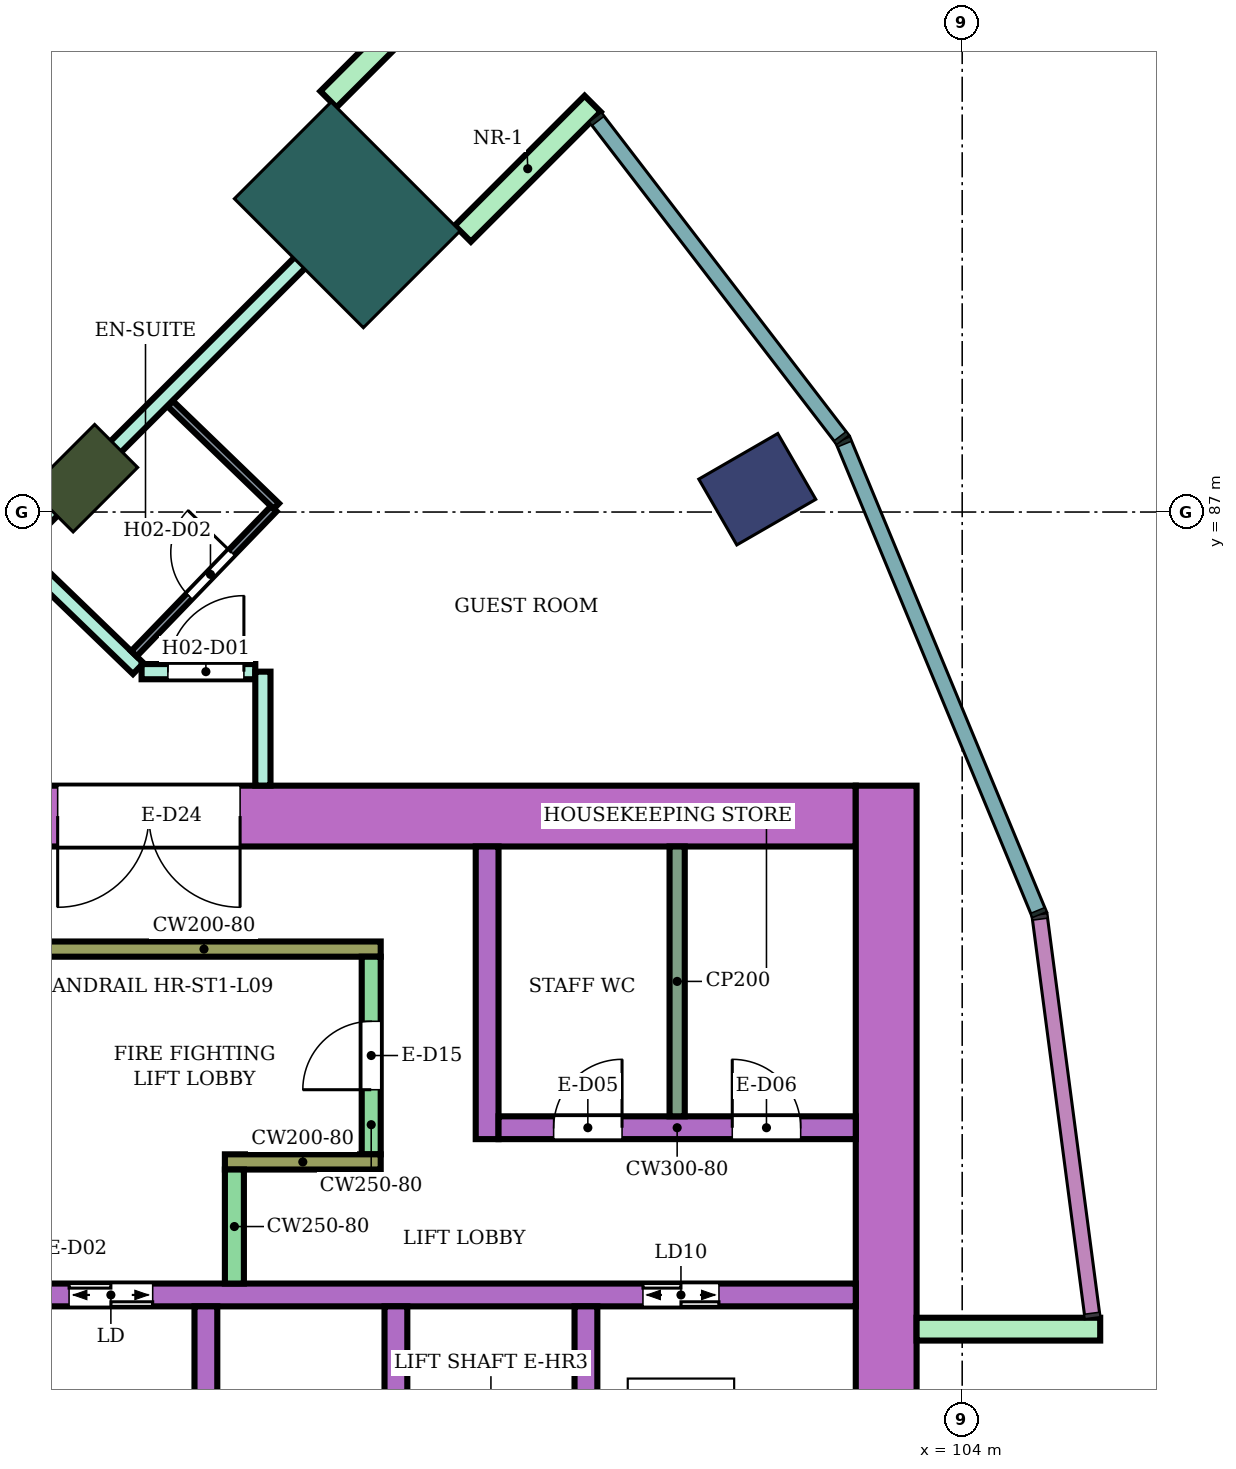
"""IFC4 building model, lengths in metres.
Left out: names, types, materials, properties, quantities, classifications, styles, units other than length and angle.
Written with IfcOpenShell. Run it as: python <this file> out.ifc"""

import sys

from ifc_helpers import new_model, si_unit, direction, frame, frame_2d, origin, origin_2d, place, context, subcontext, project, spatial, rectangle, extrude, element, fill, save


model = new_model("IFC4")
c1 = context("Model", 3, precision=1e-05, world=origin(), true_north=direction((0.0, 1.0)))
c2 = subcontext(c1, "Body", "Model", "MODEL_VIEW")
j1 = project(units=[si_unit("LENGTHUNIT", "METRE"), si_unit("PLANEANGLEUNIT", "RADIAN")], contexts=[c1])
p1 = place(None, origin())
s1 = spatial("IfcSite", under=j1, at=p1, CompositionType="ELEMENT")
p2 = place(p1, origin())
s2 = spatial("IfcBuilding", under=s1, at=p2, CompositionType="ELEMENT")
p3 = place(p2, frame((0.0, 0.0, 44.0)))
s3 = spatial("IfcBuildingStorey", under=s2, at=p3, CompositionType="ELEMENT", Elevation=44.0)
p4 = place(p3, frame((101.304, 87.3, 0.0), z_axis=(0.0, 0.0, 1.0), x_axis=(0.866025403784, 0.5, 0.0)))
e1 = element("IfcColumn", 1, at=p4, inside=s3, PredefinedType="COLUMN", context=c2, shape_type="SweptSolid", body=[
    extrude(rectangle(XDim=1.2, YDim=1.0, at=origin_2d()), origin(), (0.0, 0.0, 1.0), 3.8),
])
p5 = place(p3, frame((92.445, 87.445, 0.0), z_axis=(0.0, 0.0, 1.0), x_axis=(0.707106781187, 0.707106781187, 0.0)))
e2 = element("IfcColumn", 2, at=p5, inside=s3, PredefinedType="COLUMN", context=c2, shape_type="SweptSolid", body=[
    extrude(rectangle(XDim=1.2, YDim=0.8, at=origin_2d()), origin(), (0.0, 0.0, 1.0), 3.8),
])
p6 = place(p3, frame((95.91, 90.91, 0.0), z_axis=(0.0, 0.0, 1.0), x_axis=(0.707106781187, 0.707106781187, 0.0)))
e3 = element("IfcColumn", 3, at=p6, inside=s3, PredefinedType="COLUMN", context=c2, shape_type="SweptSolid", body=[
    extrude(rectangle(XDim=1.8, YDim=2.4, at=origin_2d()), origin(), (0.0, 0.0, 1.0), 3.8),
])
p7 = place(p3, frame((87.9, 83.0, 0.0), z_axis=(0.0, 0.0, 1.0), x_axis=(1.0, 0.0, 0.0)))
e4 = element("IfcWall", 4, at=p7, inside=s3, PredefinedType="SHEAR", context=c2, shape_type="SweptSolid", body=[
    extrude(rectangle(XDim=14.7, YDim=0.8, at=frame_2d((7.35, 0.0))), origin(), (0.0, 0.0, 1.0), 3.48),
])
p8 = place(p7, frame((4.2, 0.0, 0.0)))
e5 = element("IfcOpeningElement", 5, at=p8, cuts=e4, PredefinedType="OPENING", context=c2, shape_type="SweptSolid", body=[
    extrude(rectangle(XDim=2.4, YDim=2.4, at=frame_2d((1.2, 1.2))), frame((0.0, 0.41, 0.0), z_axis=(0.0, -1.0, 0.0), x_axis=(1.0, 0.0, 0.0)), (0.0, 0.0, 1.0), 0.82),
])
p9 = place(p3, frame((103.0, 66.6, 0.0), z_axis=(0.0, 0.0, 1.0), x_axis=(0.0, 1.0, 0.0)))
e6 = element("IfcWall", 6, at=p9, inside=s3, PredefinedType="SHEAR", context=c2, shape_type="SweptSolid", body=[
    extrude(rectangle(XDim=16.8, YDim=0.8, at=frame_2d((8.4, 0.0))), origin(), (0.0, 0.0, 1.0), 3.48),
])
p10 = place(p3, frame((91.7, 76.7, 0.0), z_axis=(0.0, 0.0, 1.0), x_axis=(1.0, 0.0, 0.0)))
e7 = element("IfcWall", 7, at=p10, inside=s3, PredefinedType="SHEAR", context=c2, shape_type="SweptSolid", body=[
    extrude(rectangle(XDim=10.9, YDim=0.3, at=frame_2d((5.45, 0.0))), origin(), (0.0, 0.0, 1.0), 3.48),
])
p11 = place(p10, frame((0.55, 0.0, 0.0)))
e8 = element("IfcOpeningElement", 8, at=p11, cuts=e7, PredefinedType="OPENING", context=c2, shape_type="SweptSolid", body=[
    extrude(rectangle(XDim=1.1, YDim=2.1, at=frame_2d((0.55, 1.05))), frame((0.0, 0.16, 0.0), z_axis=(0.0, -1.0, 0.0), x_axis=(1.0, 0.0, 0.0)), (0.0, 0.0, 1.0), 0.32),
])
p12 = place(p10, frame((8.1, 0.0, 0.0)))
e9 = element("IfcOpeningElement", 9, at=p12, cuts=e7, PredefinedType="OPENING", context=c2, shape_type="SweptSolid", body=[
    extrude(rectangle(XDim=1.0, YDim=2.1, at=frame_2d((0.5, 1.05))), frame((0.0, 0.16, 0.0), z_axis=(0.0, -1.0, 0.0), x_axis=(1.0, 0.0, 0.0)), (0.0, 0.0, 1.0), 0.32),
])
for number, where, z_axis, x_axis in (
    (10, (94.05, 74.0, 0.0), (0.0, 0.0, 1.0), (0.0, 1.0, 0.0)),
    (11, (96.55, 74.0, 0.0), (0.0, 0.0, 1.0), (0.0, 1.0, 0.0)),
    (12, (99.05, 74.0, 0.0), (0.0, 0.0, 1.0), (0.0, 1.0, 0.0)),
):
    element("IfcWall", number, at=place(p3, frame(where, z_axis=z_axis, x_axis=x_axis)), inside=s3, PredefinedType="SHEAR", context=c2, shape_type="SweptSolid", body=[
        extrude(rectangle(XDim=2.55, YDim=0.3, at=frame_2d((1.275, 0.0))), origin(), (0.0, 0.0, 1.0), 3.48),
    ])
p13 = place(p3, frame((91.7, 81.25, 0.0), z_axis=(0.0, 0.0, 1.0), x_axis=(1.0, 0.0, 0.0)))
e13 = element("IfcWall", 13, at=p13, inside=s3, PredefinedType="SHEAR", context=c2, shape_type="SweptSolid", body=[
    extrude(rectangle(XDim=4.65, YDim=0.2, at=frame_2d((2.325, 0.0))), origin(), (0.0, 0.0, 1.0), 3.48),
])
p14 = place(p3, frame((96.225, 78.55, 0.0), z_axis=(0.0, 0.0, 1.0), x_axis=(0.0, 1.0, 0.0)))
e14 = element("IfcWall", 14, at=p14, inside=s3, PredefinedType="SHEAR", context=c2, shape_type="SweptSolid", body=[
    extrude(rectangle(XDim=2.6, YDim=0.25, at=frame_2d((1.3, 0.0))), origin(), (0.0, 0.0, 1.0), 3.48),
])
p15 = place(p14, frame((0.85, 0.0, 0.0)))
e15 = element("IfcOpeningElement", 15, at=p15, cuts=e14, PredefinedType="OPENING", context=c2, shape_type="SweptSolid", body=[
    extrude(rectangle(XDim=0.9, YDim=2.1, at=frame_2d((0.45, 1.05))), frame((0.0, 0.135, 0.0), z_axis=(0.0, -1.0, 0.0), x_axis=(1.0, 0.0, 0.0)), (0.0, 0.0, 1.0), 0.27),
])
p16 = place(p3, frame((94.3, 78.45, 0.0), z_axis=(0.0, 0.0, 1.0), x_axis=(1.0, 0.0, 0.0)))
e16 = element("IfcWall", 16, at=p16, inside=s3, PredefinedType="SHEAR", context=c2, shape_type="SweptSolid", body=[
    extrude(rectangle(XDim=2.05, YDim=0.2, at=frame_2d((1.025, 0.0))), origin(), (0.0, 0.0, 1.0), 3.48),
])
p17 = place(p3, frame((94.425, 76.85, 0.0), z_axis=(0.0, 0.0, 1.0), x_axis=(0.0, 1.0, 0.0)))
e17 = element("IfcWall", 17, at=p17, inside=s3, PredefinedType="SHEAR", context=c2, shape_type="SweptSolid", body=[
    extrude(rectangle(XDim=1.5, YDim=0.25, at=frame_2d((0.75, 0.0))), origin(), (0.0, 0.0, 1.0), 3.48),
])
p18 = place(p3, frame((97.75, 78.75, 0.0), z_axis=(0.0, 0.0, 1.0), x_axis=(0.0, 1.0, 0.0)))
e18 = element("IfcWall", 18, at=p18, inside=s3, PredefinedType="SHEAR", context=c2, shape_type="SweptSolid", body=[
    extrude(rectangle(XDim=3.85, YDim=0.3, at=frame_2d((1.925, 0.0))), origin(), (0.0, 0.0, 1.0), 3.48),
])
p19 = place(p3, frame((97.9, 78.9, 0.0), z_axis=(0.0, 0.0, 1.0), x_axis=(1.0, 0.0, 0.0)))
e19 = element("IfcWall", 19, at=p19, inside=s3, PredefinedType="SHEAR", context=c2, shape_type="SweptSolid", body=[
    extrude(rectangle(XDim=4.7, YDim=0.3, at=frame_2d((2.35, 0.0))), origin(), (0.0, 0.0, 1.0), 3.48),
])
p20 = place(p19, frame((0.725, 0.0, 0.0)))
e20 = element("IfcOpeningElement", 20, at=p20, cuts=e19, PredefinedType="OPENING", context=c2, shape_type="SweptSolid", body=[
    extrude(rectangle(XDim=0.9, YDim=2.1, at=frame_2d((0.45, 1.05))), frame((0.0, 0.16, 0.0), z_axis=(0.0, -1.0, 0.0), x_axis=(1.0, 0.0, 0.0)), (0.0, 0.0, 1.0), 0.32),
])
p21 = place(p19, frame((3.075, 0.0, 0.0)))
e21 = element("IfcOpeningElement", 21, at=p21, cuts=e19, PredefinedType="OPENING", context=c2, shape_type="SweptSolid", body=[
    extrude(rectangle(XDim=0.9, YDim=2.1, at=frame_2d((0.45, 1.05))), frame((0.0, 0.16, 0.0), z_axis=(0.0, -1.0, 0.0), x_axis=(1.0, 0.0, 0.0)), (0.0, 0.0, 1.0), 0.32),
])
for number, where, z_axis, x_axis in (
    (22, (103.4, 76.25, 0.0), (0.0, 0.0, 1.0), (1.0, 0.0, 0.0)),
    (23, (97.43, 90.662, 0.0), (0.0, 0.0, 1.0), (0.707, 0.707, 0.0)),
    (24, (95.662, 92.43, 0.0), (0.0, 0.0, 1.0), (0.707, 0.707, 0.0)),
):
    element("IfcWall", number, at=place(p3, frame(where, z_axis=z_axis, x_axis=x_axis)), inside=s3, PredefinedType="NOTDEFINED", context=c2, shape_type="SweptSolid", body=[
        extrude(rectangle(XDim=2.416, YDim=0.3, at=frame_2d((1.208, 0.0))), origin(), (0.0, 0.0, 1.0), 3.8),
    ])
p22 = place(p3, frame((88.465, 89.473, 0.0), z_axis=(0.0, 0.0, 1.0), x_axis=(0.719474304909, -0.694519059908, 0.0)))
e25 = element("IfcWall", 25, at=p22, inside=s3, PredefinedType="PARTITIONING", context=c2, shape_type="SweptSolid", body=[
    extrude(rectangle(XDim=6.525, YDim=0.2, at=frame_2d((3.263, 0.0))), origin(), (0.0, 0.0, 1.0), 3.35),
])
p23 = place(p22, frame((2.719, 0.0, 0.0)))
e26 = element("IfcOpeningElement", 26, at=p23, cuts=e25, PredefinedType="OPENING", context=c2, shape_type="SweptSolid", body=[
    extrude(rectangle(XDim=1.0, YDim=2.1, at=frame_2d((0.5, 1.05))), frame((0.0, 0.11, 0.0), z_axis=(0.0, -1.0, 0.0), x_axis=(1.0, 0.0, 0.0)), (0.0, 0.0, 1.0), 0.22),
])
p24 = place(p3, frame((88.397, 89.539, 0.0), z_axis=(0.0, 0.0, 1.0), x_axis=(0.500228379329, 0.86589350876, 0.0)))
e27 = element("IfcWall", 27, at=p24, inside=s3, PredefinedType="PARTITIONING", context=c2, shape_type="SweptSolid", body=[
    extrude(rectangle(XDim=9.008, YDim=0.2, at=frame_2d((4.504, 0.0))), origin(), (0.0, 0.0, 1.0), 3.35),
])
p25 = place(p3, frame((91.595, 86.59, 0.0), z_axis=(0.0, 0.0, 1.0), x_axis=(0.707232337591, 0.706981202484, 0.0)))
e28 = element("IfcWall", 28, at=p25, inside=s3, PredefinedType="PARTITIONING", context=c2, shape_type="SweptSolid", body=[
    extrude(rectangle(XDim=6.805, YDim=0.2, at=frame_2d((3.402, 0.0))), origin(), (0.0, 0.0, 1.0), 3.35),
])
p26 = place(p3, frame((93.204, 84.9, 0.0), z_axis=(0.0, 0.0, 1.0), x_axis=(1.0, 0.0, 0.0)))
e29 = element("IfcWall", 29, at=p26, inside=s3, PredefinedType="PARTITIONING", context=c2, shape_type="SweptSolid", body=[
    extrude(rectangle(XDim=1.496, YDim=0.2, at=frame_2d((0.748, 0.0))), origin(), (0.0, 0.0, 1.0), 3.35),
])
p27 = place(p26, frame((0.346, 0.0, 0.0)))
e30 = element("IfcOpeningElement", 30, at=p27, cuts=e29, PredefinedType="OPENING", context=c2, shape_type="SweptSolid", body=[
    extrude(rectangle(XDim=1.0, YDim=2.1, at=frame_2d((0.5, 1.05))), frame((0.0, 0.11, 0.0), z_axis=(0.0, -1.0, 0.0), x_axis=(1.0, 0.0, 0.0)), (0.0, 0.0, 1.0), 0.22),
])
p28 = place(p3, frame((94.8, 83.401, 0.0), z_axis=(0.0, 0.0, 1.0), x_axis=(0.0, 1.0, 0.0)))
e31 = element("IfcWall", 31, at=p28, inside=s3, PredefinedType="PARTITIONING", context=c2, shape_type="SweptSolid", body=[
    extrude(rectangle(XDim=1.499, YDim=0.2, at=frame_2d((0.75, 0.0))), origin(), (0.0, 0.0, 1.0), 3.35),
])
p29 = place(p3, frame((93.104, 85.136, 0.0), z_axis=(0.0, 0.0, 1.0), x_axis=(0.694324808789, 0.719661767708, 0.0)))
e32 = element("IfcWall", 32, at=p29, inside=s3, PredefinedType="PARTITIONING", context=c2, shape_type="SweptSolid", body=[
    extrude(rectangle(XDim=2.65, YDim=0.1, at=frame_2d((1.325, 0.0))), origin(), (0.0, 0.0, 1.0), 3.35),
])
p30 = place(p29, frame((1.05, 0.0, 0.0)))
e33 = element("IfcOpeningElement", 33, at=p30, cuts=e32, PredefinedType="OPENING", context=c2, shape_type="SweptSolid", body=[
    extrude(rectangle(XDim=0.8, YDim=2.1, at=frame_2d((0.4, 1.05))), frame((0.0, 0.06, 0.0), z_axis=(0.0, -1.0, 0.0), x_axis=(1.0, 0.0, 0.0)), (0.0, 0.0, 1.0), 0.12),
])
p31 = place(p3, frame((93.582, 88.425, 0.0), z_axis=(0.0, 0.0, 1.0), x_axis=(0.719334224501, -0.694664144361, 0.0)))
e34 = element("IfcWall", 34, at=p31, inside=s3, PredefinedType="PARTITIONING", context=c2, shape_type="SweptSolid", body=[
    extrude(rectangle(XDim=1.94, YDim=0.1, at=frame_2d((0.97, 0.0))), origin(), (0.0, 0.0, 1.0), 3.35),
])
p32 = place(p3, frame((100.25, 79.05, 0.0), z_axis=(0.0, 0.0, 1.0), x_axis=(0.0, 1.0, 0.0)))
e35 = element("IfcWall", 35, at=p32, inside=s3, PredefinedType="PARTITIONING", context=c2, shape_type="SweptSolid", body=[
    extrude(rectangle(XDim=3.55, YDim=0.2, at=frame_2d((1.775, 0.0))), origin(), (0.0, 0.0, 1.0), 3.48),
])
p33 = place(p27, origin())
e36 = element("IfcDoor", 36, at=p33, inside=s3, OperationType="SINGLE_SWING_RIGHT", PredefinedType="DOOR", context=c2, shape_type="SweptSolid", body=[
    extrude(rectangle(XDim=1.0, YDim=2.1, at=frame_2d((0.5, 1.05))), frame((0.0, 0.025, 0.0), z_axis=(0.0, -1.0, 0.0), x_axis=(1.0, 0.0, 0.0)), (0.0, 0.0, 1.0), 0.05),
])
fill(e30, e36)
p34 = place(p30, origin())
e37 = element("IfcDoor", 37, at=p34, inside=s3, OperationType="SINGLE_SWING_RIGHT", PredefinedType="DOOR", context=c2, shape_type="SweptSolid", body=[
    extrude(rectangle(XDim=0.8, YDim=2.1, at=frame_2d((0.4, 1.05))), frame((0.0, 0.025, 0.0), z_axis=(0.0, -1.0, 0.0), x_axis=(1.0, 0.0, 0.0)), (0.0, 0.0, 1.0), 0.05),
])
fill(e33, e37)
p35 = place(p11, origin())
e38 = element("IfcDoor", 38, at=p35, inside=s3, OperationType="DOUBLE_DOOR_SLIDING", PredefinedType="DOOR", context=c2, shape_type="SweptSolid", body=[
    extrude(rectangle(XDim=1.1, YDim=2.1, at=frame_2d((0.55, 1.05))), frame((0.0, 0.025, 0.0), z_axis=(0.0, -1.0, 0.0), x_axis=(1.0, 0.0, 0.0)), (0.0, 0.0, 1.0), 0.05),
])
fill(e8, e38)
p36 = place(p12, origin())
e39 = element("IfcDoor", 39, at=p36, inside=s3, OperationType="DOUBLE_DOOR_SLIDING", PredefinedType="DOOR", context=c2, shape_type="SweptSolid", body=[
    extrude(rectangle(XDim=1.0, YDim=2.1, at=frame_2d((0.5, 1.05))), frame((0.0, 0.025, 0.0), z_axis=(0.0, -1.0, 0.0), x_axis=(1.0, 0.0, 0.0)), (0.0, 0.0, 1.0), 0.05),
])
fill(e9, e39)
p37 = place(p15, origin())
e40 = element("IfcDoor", 40, at=p37, inside=s3, OperationType="SINGLE_SWING_LEFT", PredefinedType="DOOR", context=c2, shape_type="SweptSolid", body=[
    extrude(rectangle(XDim=0.9, YDim=2.1, at=frame_2d((0.45, 1.05))), frame((0.0, 0.025, 0.0), z_axis=(0.0, -1.0, 0.0), x_axis=(1.0, 0.0, 0.0)), (0.0, 0.0, 1.0), 0.05),
])
fill(e15, e40)
p38 = place(p20, origin())
e41 = element("IfcDoor", 41, at=p38, inside=s3, OperationType="SINGLE_SWING_RIGHT", PredefinedType="DOOR", context=c2, shape_type="SweptSolid", body=[
    extrude(rectangle(XDim=0.9, YDim=2.1, at=frame_2d((0.45, 1.05))), frame((0.0, 0.025, 0.0), z_axis=(0.0, -1.0, 0.0), x_axis=(1.0, 0.0, 0.0)), (0.0, 0.0, 1.0), 0.05),
])
fill(e20, e41)
p39 = place(p21, origin())
e42 = element("IfcDoor", 42, at=p39, inside=s3, OperationType="SINGLE_SWING_LEFT", PredefinedType="DOOR", context=c2, shape_type="SweptSolid", body=[
    extrude(rectangle(XDim=0.9, YDim=2.1, at=frame_2d((0.45, 1.05))), frame((0.0, 0.025, 0.0), z_axis=(0.0, -1.0, 0.0), x_axis=(1.0, 0.0, 0.0)), (0.0, 0.0, 1.0), 0.05),
])
fill(e21, e42)
p40 = place(p8, frame((2.4, 0.0, 0.0), z_axis=(0.0, 0.0, 1.0), x_axis=(-1.0, 0.0, 0.0)))
e43 = element("IfcDoor", 43, at=p40, inside=s3, OperationType="DOUBLE_DOOR_SINGLE_SWING", PredefinedType="DOOR", context=c2, shape_type="SweptSolid", body=[
    extrude(rectangle(XDim=2.4, YDim=2.4, at=frame_2d((1.2, 1.2))), frame((0.0, 0.025, 0.0), z_axis=(0.0, -1.0, 0.0), x_axis=(1.0, 0.0, 0.0)), (0.0, 0.0, 1.0), 0.05),
])
fill(e5, e43)
save(model, sys.argv[1])
